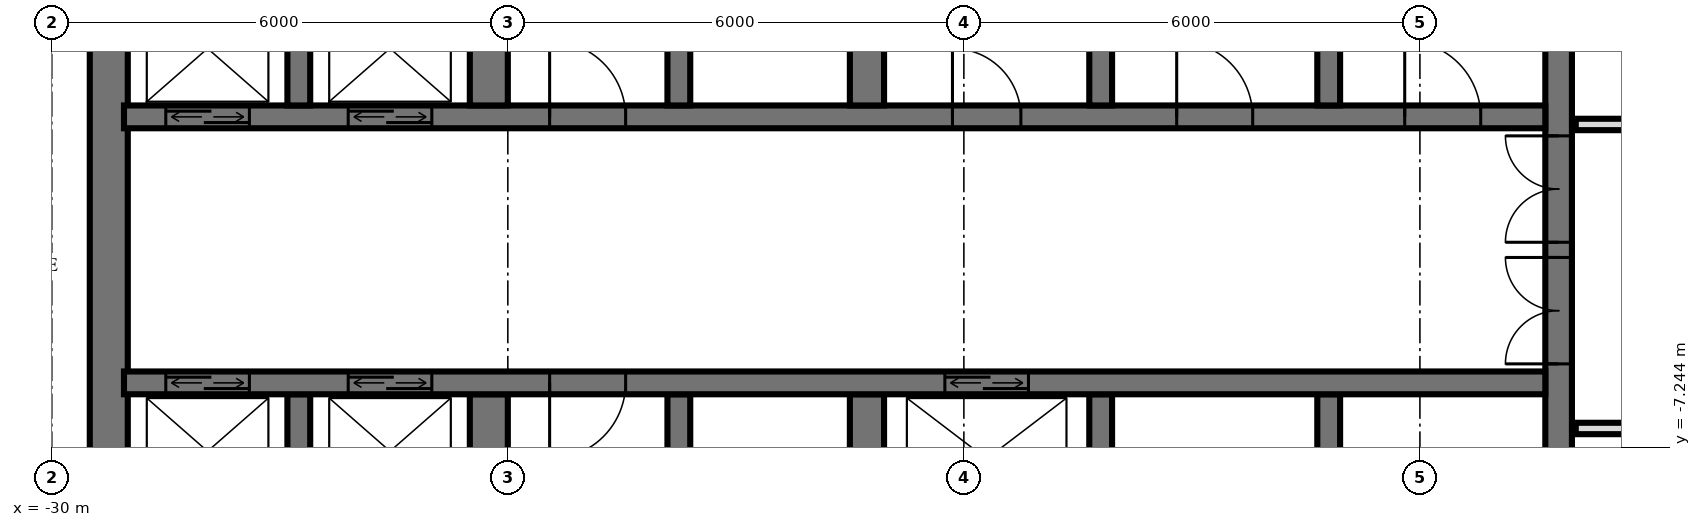
"""IFC4 building model, lengths in metres.
Left out: names, types, materials, properties, quantities, classifications, styles, units other than length and angle.
Written with IfcOpenShell. Run it as: python <this file> out.ifc"""

import sys

from ifc_helpers import new_model, si_unit, direction, frame, frame_2d, origin, place, context, subcontext, project, spatial, rectangle, extrude, element, fill, save


model = new_model("IFC4")
c1 = context("Model", 3, precision=1e-05, world=origin(), true_north=direction((0.0, 1.0)))
c2 = subcontext(c1, "Body", "Model", "MODEL_VIEW")
j1 = project(units=[si_unit("LENGTHUNIT", "METRE"), si_unit("PLANEANGLEUNIT", "RADIAN")], contexts=[c1])
p1 = place(None, origin())
s1 = spatial("IfcSite", under=j1, at=p1, CompositionType="ELEMENT")
p2 = place(p1, origin())
s2 = spatial("IfcBuilding", under=s1, at=p2, CompositionType="ELEMENT")
p3 = place(p2, frame((0.0, 0.0, 56.4)))
s3 = spatial("IfcBuildingStorey", under=s2, at=p3, CompositionType="ELEMENT", Elevation=56.4)
p4 = place(p3, frame((-10.175, -14.55, 0.0), z_axis=(0.0, 0.0, 1.0), x_axis=(0.0, 1.0, 0.0)))
e1 = element("IfcWall", 1, at=p4, inside=s3, PredefinedType="SHEAR", context=c2, shape_type="SweptSolid", body=[
    extrude(rectangle(XDim=14.1, YDim=0.35, at=frame_2d((7.05, 0.0))), origin(), (0.0, 0.0, 1.0), 3.6),
])
p5 = place(p4, frame((8.4, 0.0, 0.0)))
e2 = element("IfcOpeningElement", 2, at=p5, cuts=e1, PredefinedType="OPENING", context=c2, shape_type="SweptSolid", body=[
    extrude(rectangle(XDim=1.4, YDim=2.4, at=frame_2d((0.7, 1.2))), frame((0.0, 0.185, 0.0), z_axis=(0.0, -1.0, 0.0), x_axis=(1.0, 0.0, 0.0)), (0.0, 0.0, 1.0), 0.37),
])
p6 = place(p4, frame((10.0, 0.0, 0.0)))
e3 = element("IfcOpeningElement", 3, at=p6, cuts=e1, PredefinedType="OPENING", context=c2, shape_type="SweptSolid", body=[
    extrude(rectangle(XDim=1.4, YDim=2.4, at=frame_2d((0.7, 1.2))), frame((0.0, 0.185, 0.0), z_axis=(0.0, -1.0, 0.0), x_axis=(1.0, 0.0, 0.0)), (0.0, 0.0, 1.0), 0.37),
])
p7 = place(p4, frame((4.0, 0.0, 0.0)))
e4 = element("IfcOpeningElement", 4, at=p7, cuts=e1, PredefinedType="OPENING", context=c2, shape_type="SweptSolid", body=[
    extrude(rectangle(XDim=1.2, YDim=2.1, at=frame_2d((0.6, 1.05))), frame((0.0, 0.185, 0.0), z_axis=(0.0, -1.0, 0.0), x_axis=(1.0, 0.0, 0.0)), (0.0, 0.0, 1.0), 0.37),
])
p8 = place(p3, frame((-29.25, -14.55, 0.0), z_axis=(0.0, 0.0, 1.0), x_axis=(0.0, 1.0, 0.0)))
e5 = element("IfcWall", 5, at=p8, inside=s3, PredefinedType="SHEAR", context=c2, shape_type="SweptSolid", body=[
    extrude(rectangle(XDim=14.1, YDim=0.5, at=frame_2d((7.05, 0.0))), origin(), (0.0, 0.0, 1.0), 3.6),
])
p9 = place(p3, frame((-29.05, -2.9, 0.0), z_axis=(0.0, 0.0, 1.0), x_axis=(1.0, 0.0, 0.0)))
e6 = element("IfcWall", 6, at=p9, inside=s3, PredefinedType="SHEAR", context=c2, shape_type="SweptSolid", body=[
    extrude(rectangle(XDim=18.7, YDim=0.3, at=frame_2d((9.35, 0.0))), origin(), (0.0, 0.0, 1.0), 3.6),
])
p10 = place(p9, frame((2.95, 0.0, 0.0)))
e7 = element("IfcOpeningElement", 7, at=p10, cuts=e6, PredefinedType="OPENING", context=c2, shape_type="SweptSolid", body=[
    extrude(rectangle(XDim=1.1, YDim=2.1, at=frame_2d((0.55, 1.05))), frame((0.0, 0.16, 0.0), z_axis=(0.0, -1.0, 0.0), x_axis=(1.0, 0.0, 0.0)), (0.0, 0.0, 1.0), 0.32),
])
p11 = place(p9, frame((0.55, 0.0, 0.0)))
e8 = element("IfcOpeningElement", 8, at=p11, cuts=e6, PredefinedType="OPENING", context=c2, shape_type="SweptSolid", body=[
    extrude(rectangle(XDim=1.1, YDim=2.1, at=frame_2d((0.55, 1.05))), frame((0.0, 0.16, 0.0), z_axis=(0.0, -1.0, 0.0), x_axis=(1.0, 0.0, 0.0)), (0.0, 0.0, 1.0), 0.32),
])
p12 = place(p9, frame((10.9, 0.0, 0.0)))
e9 = element("IfcOpeningElement", 9, at=p12, cuts=e6, PredefinedType="OPENING", context=c2, shape_type="SweptSolid", body=[
    extrude(rectangle(XDim=0.9, YDim=2.1, at=frame_2d((0.45, 1.05))), frame((0.0, 0.16, 0.0), z_axis=(0.0, -1.0, 0.0), x_axis=(1.0, 0.0, 0.0)), (0.0, 0.0, 1.0), 0.32),
])
p13 = place(p9, frame((16.85, 0.0, 0.0)))
e10 = element("IfcOpeningElement", 10, at=p13, cuts=e6, PredefinedType="OPENING", context=c2, shape_type="SweptSolid", body=[
    extrude(rectangle(XDim=1.0, YDim=2.1, at=frame_2d((0.5, 1.05))), frame((0.0, 0.16, 0.0), z_axis=(0.0, -1.0, 0.0), x_axis=(1.0, 0.0, 0.0)), (0.0, 0.0, 1.0), 0.32),
])
p14 = place(p9, frame((13.85, 0.0, 0.0)))
e11 = element("IfcOpeningElement", 11, at=p14, cuts=e6, PredefinedType="OPENING", context=c2, shape_type="SweptSolid", body=[
    extrude(rectangle(XDim=1.0, YDim=2.1, at=frame_2d((0.5, 1.05))), frame((0.0, 0.16, 0.0), z_axis=(0.0, -1.0, 0.0), x_axis=(1.0, 0.0, 0.0)), (0.0, 0.0, 1.0), 0.32),
])
p15 = place(p9, frame((5.6, 0.0, 0.0)))
e12 = element("IfcOpeningElement", 12, at=p15, cuts=e6, PredefinedType="OPENING", context=c2, shape_type="SweptSolid", body=[
    extrude(rectangle(XDim=1.0, YDim=2.1, at=frame_2d((0.5, 1.05))), frame((0.0, 0.16, 0.0), z_axis=(0.0, -1.0, 0.0), x_axis=(1.0, 0.0, 0.0)), (0.0, 0.0, 1.0), 0.32),
])
p16 = place(p3, frame((-29.05, -6.4, 0.0), z_axis=(0.0, 0.0, 1.0), x_axis=(1.0, 0.0, 0.0)))
e13 = element("IfcWall", 13, at=p16, inside=s3, PredefinedType="SHEAR", context=c2, shape_type="SweptSolid", body=[
    extrude(rectangle(XDim=18.7, YDim=0.3, at=frame_2d((9.35, 0.0))), origin(), (0.0, 0.0, 1.0), 3.6),
])
p17 = place(p16, frame((2.95, 0.0, 0.0)))
e14 = element("IfcOpeningElement", 14, at=p17, cuts=e13, PredefinedType="OPENING", context=c2, shape_type="SweptSolid", body=[
    extrude(rectangle(XDim=1.1, YDim=2.1, at=frame_2d((0.55, 1.05))), frame((0.0, 0.16, 0.0), z_axis=(0.0, -1.0, 0.0), x_axis=(1.0, 0.0, 0.0)), (0.0, 0.0, 1.0), 0.32),
])
p18 = place(p16, frame((0.55, 0.0, 0.0)))
e15 = element("IfcOpeningElement", 15, at=p18, cuts=e13, PredefinedType="OPENING", context=c2, shape_type="SweptSolid", body=[
    extrude(rectangle(XDim=1.1, YDim=2.1, at=frame_2d((0.55, 1.05))), frame((0.0, 0.16, 0.0), z_axis=(0.0, -1.0, 0.0), x_axis=(1.0, 0.0, 0.0)), (0.0, 0.0, 1.0), 0.32),
])
p19 = place(p16, frame((10.8, 0.0, 0.0)))
e16 = element("IfcOpeningElement", 16, at=p19, cuts=e13, PredefinedType="OPENING", context=c2, shape_type="SweptSolid", body=[
    extrude(rectangle(XDim=1.1, YDim=2.1, at=frame_2d((0.55, 1.05))), frame((0.0, 0.16, 0.0), z_axis=(0.0, -1.0, 0.0), x_axis=(1.0, 0.0, 0.0)), (0.0, 0.0, 1.0), 0.32),
])
p20 = place(p16, frame((5.6, 0.0, 0.0)))
e17 = element("IfcOpeningElement", 17, at=p20, cuts=e13, PredefinedType="OPENING", context=c2, shape_type="SweptSolid", body=[
    extrude(rectangle(XDim=1.0, YDim=2.1, at=frame_2d((0.5, 1.05))), frame((0.0, 0.16, 0.0), z_axis=(0.0, -1.0, 0.0), x_axis=(1.0, 0.0, 0.0)), (0.0, 0.0, 1.0), 0.32),
])
for number, where, z_axis, x_axis in (
    (18, (-13.2, -2.75, 0.0), (0.0, 0.0, 1.0), (0.0, 1.0, 0.0)),
    (19, (-13.2, -8.85, 0.0), (0.0, 0.0, 1.0), (0.0, 1.0, 0.0)),
    (20, (-16.2, -2.75, 0.0), (0.0, 0.0, 1.0), (0.0, 1.0, 0.0)),
    (21, (-16.2, -8.85, 0.0), (0.0, 0.0, 1.0), (0.0, 1.0, 0.0)),
):
    element("IfcWall", number, at=place(p3, frame(where, z_axis=z_axis, x_axis=x_axis)), inside=s3, PredefinedType="SHEAR", context=c2, shape_type="SweptSolid", body=[
        extrude(rectangle(XDim=2.3, YDim=0.3, at=frame_2d((1.15, 0.0))), origin(), (0.0, 0.0, 1.0), 3.6),
    ])
for number, where, z_axis, x_axis in (
    (22, (-19.275, -2.75, 0.0), (0.0, 0.0, 1.0), (0.0, 1.0, 0.0)),
    (23, (-19.275, -8.85, 0.0), (0.0, 0.0, 1.0), (0.0, 1.0, 0.0)),
):
    element("IfcWall", number, at=place(p3, frame(where, z_axis=z_axis, x_axis=x_axis)), inside=s3, PredefinedType="SHEAR", context=c2, shape_type="SweptSolid", body=[
        extrude(rectangle(XDim=2.3, YDim=0.45, at=frame_2d((1.15, 0.0))), origin(), (0.0, 0.0, 1.0), 3.6),
    ])
for number, where, z_axis, x_axis in (
    (24, (-21.75, -2.75, 0.0), (0.0, 0.0, 1.0), (0.0, 1.0, 0.0)),
    (25, (-21.75, -8.85, 0.0), (0.0, 0.0, 1.0), (0.0, 1.0, 0.0)),
):
    element("IfcWall", number, at=place(p3, frame(where, z_axis=z_axis, x_axis=x_axis)), inside=s3, PredefinedType="SHEAR", context=c2, shape_type="SweptSolid", body=[
        extrude(rectangle(XDim=2.3, YDim=0.3, at=frame_2d((1.15, 0.0))), origin(), (0.0, 0.0, 1.0), 3.6),
    ])
for number, where, z_axis, x_axis in (
    (26, (-24.25, -2.75, 0.0), (0.0, 0.0, 1.0), (0.0, 1.0, 0.0)),
    (27, (-24.25, -8.85, 0.0), (0.0, 0.0, 1.0), (0.0, 1.0, 0.0)),
):
    element("IfcWall", number, at=place(p3, frame(where, z_axis=z_axis, x_axis=x_axis)), inside=s3, PredefinedType="SHEAR", context=c2, shape_type="SweptSolid", body=[
        extrude(rectangle(XDim=2.3, YDim=0.5, at=frame_2d((1.15, 0.0))), origin(), (0.0, 0.0, 1.0), 3.6),
    ])
for number, where, z_axis, x_axis in (
    (28, (-26.75, -2.75, 0.0), (0.0, 0.0, 1.0), (0.0, 1.0, 0.0)),
    (29, (-26.75, -8.85, 0.0), (0.0, 0.0, 1.0), (0.0, 1.0, 0.0)),
):
    element("IfcWall", number, at=place(p3, frame(where, z_axis=z_axis, x_axis=x_axis)), inside=s3, PredefinedType="SHEAR", context=c2, shape_type="SweptSolid", body=[
        extrude(rectangle(XDim=2.3, YDim=0.3, at=frame_2d((1.15, 0.0))), origin(), (0.0, 0.0, 1.0), 3.6),
    ])
p21 = place(p3, frame((-9.95, -7.0, 0.0), z_axis=(0.0, 0.0, 1.0), x_axis=(1.0, 0.0, 0.0)))
e30 = element("IfcWall", 30, at=p21, inside=s3, PredefinedType="PARTITIONING", context=c2, shape_type="SweptSolid", body=[
    extrude(rectangle(XDim=19.9, YDim=0.15, at=frame_2d((9.95, 0.0))), origin(), (0.0, 0.0, 1.0), 3.32),
])
p22 = place(p21, frame((9.45, 0.0, 0.0)))
e31 = element("IfcOpeningElement", 31, at=p22, cuts=e30, PredefinedType="OPENING", context=c2, shape_type="SweptSolid", body=[
    extrude(rectangle(XDim=1.0, YDim=2.1, at=frame_2d((0.5, 1.05))), frame((0.0, 0.085, 0.0), z_axis=(0.0, -1.0, 0.0), x_axis=(1.0, 0.0, 0.0)), (0.0, 0.0, 1.0), 0.17),
])
p23 = place(p21, frame((15.45, 0.0, 0.0)))
e32 = element("IfcOpeningElement", 32, at=p23, cuts=e30, PredefinedType="OPENING", context=c2, shape_type="SweptSolid", body=[
    extrude(rectangle(XDim=1.0, YDim=2.1, at=frame_2d((0.5, 1.05))), frame((0.0, 0.085, 0.0), z_axis=(0.0, -1.0, 0.0), x_axis=(1.0, 0.0, 0.0)), (0.0, 0.0, 1.0), 0.17),
])
p24 = place(p3, frame((-9.95, -3.0, 0.0), z_axis=(0.0, 0.0, 1.0), x_axis=(1.0, 0.0, 0.0)))
e33 = element("IfcWall", 33, at=p24, inside=s3, PredefinedType="PARTITIONING", context=c2, shape_type="SweptSolid", body=[
    extrude(rectangle(XDim=19.9, YDim=0.15, at=frame_2d((9.95, 0.0))), origin(), (0.0, 0.0, 1.0), 3.32),
])
p25 = place(p24, frame((0.95, 0.0, 0.0)))
e34 = element("IfcOpeningElement", 34, at=p25, cuts=e33, PredefinedType="OPENING", context=c2, shape_type="SweptSolid", body=[
    extrude(rectangle(XDim=1.0, YDim=2.1, at=frame_2d((0.5, 1.05))), frame((0.0, 0.085, 0.0), z_axis=(0.0, -1.0, 0.0), x_axis=(1.0, 0.0, 0.0)), (0.0, 0.0, 1.0), 0.17),
])
p26 = place(p24, frame((3.7, 0.0, 0.0)))
e35 = element("IfcOpeningElement", 35, at=p26, cuts=e33, PredefinedType="OPENING", context=c2, shape_type="SweptSolid", body=[
    extrude(rectangle(XDim=1.0, YDim=2.1, at=frame_2d((0.5, 1.05))), frame((0.0, 0.085, 0.0), z_axis=(0.0, -1.0, 0.0), x_axis=(1.0, 0.0, 0.0)), (0.0, 0.0, 1.0), 0.17),
])
p27 = place(p24, frame((7.95, 0.0, 0.0)))
e36 = element("IfcOpeningElement", 36, at=p27, cuts=e33, PredefinedType="OPENING", context=c2, shape_type="SweptSolid", body=[
    extrude(rectangle(XDim=1.0, YDim=2.1, at=frame_2d((0.5, 1.05))), frame((0.0, 0.085, 0.0), z_axis=(0.0, -1.0, 0.0), x_axis=(1.0, 0.0, 0.0)), (0.0, 0.0, 1.0), 0.17),
])
p28 = place(p24, frame((15.2, 0.0, 0.0)))
e37 = element("IfcOpeningElement", 37, at=p28, cuts=e33, PredefinedType="OPENING", context=c2, shape_type="SweptSolid", body=[
    extrude(rectangle(XDim=1.0, YDim=2.1, at=frame_2d((0.5, 1.05))), frame((0.0, 0.085, 0.0), z_axis=(0.0, -1.0, 0.0), x_axis=(1.0, 0.0, 0.0)), (0.0, 0.0, 1.0), 0.17),
])
p29 = place(p10, origin())
e38 = element("IfcDoor", 38, at=p29, inside=s3, OperationType="DOUBLE_DOOR_SLIDING", PredefinedType="USERDEFINED", context=c2, shape_type="SweptSolid", body=[
    extrude(rectangle(XDim=1.1, YDim=2.1, at=frame_2d((0.55, 1.05))), frame((0.0, 0.025, 0.0), z_axis=(0.0, -1.0, 0.0), x_axis=(1.0, 0.0, 0.0)), (0.0, 0.0, 1.0), 0.05),
])
fill(e7, e38)
p30 = place(p11, origin())
e39 = element("IfcDoor", 39, at=p30, inside=s3, OperationType="DOUBLE_DOOR_SLIDING", PredefinedType="USERDEFINED", context=c2, shape_type="SweptSolid", body=[
    extrude(rectangle(XDim=1.1, YDim=2.1, at=frame_2d((0.55, 1.05))), frame((0.0, 0.025, 0.0), z_axis=(0.0, -1.0, 0.0), x_axis=(1.0, 0.0, 0.0)), (0.0, 0.0, 1.0), 0.05),
])
fill(e8, e39)
p31 = place(p17, origin())
e40 = element("IfcDoor", 40, at=p31, inside=s3, OperationType="DOUBLE_DOOR_SLIDING", PredefinedType="USERDEFINED", context=c2, shape_type="SweptSolid", body=[
    extrude(rectangle(XDim=1.1, YDim=2.1, at=frame_2d((0.55, 1.05))), frame((0.0, 0.025, 0.0), z_axis=(0.0, -1.0, 0.0), x_axis=(1.0, 0.0, 0.0)), (0.0, 0.0, 1.0), 0.05),
])
fill(e14, e40)
p32 = place(p18, origin())
e41 = element("IfcDoor", 41, at=p32, inside=s3, OperationType="DOUBLE_DOOR_SLIDING", PredefinedType="USERDEFINED", context=c2, shape_type="SweptSolid", body=[
    extrude(rectangle(XDim=1.1, YDim=2.1, at=frame_2d((0.55, 1.05))), frame((0.0, 0.025, 0.0), z_axis=(0.0, -1.0, 0.0), x_axis=(1.0, 0.0, 0.0)), (0.0, 0.0, 1.0), 0.05),
])
fill(e15, e41)
p33 = place(p19, origin())
e42 = element("IfcDoor", 42, at=p33, inside=s3, OperationType="DOUBLE_DOOR_SLIDING", PredefinedType="USERDEFINED", context=c2, shape_type="SweptSolid", body=[
    extrude(rectangle(XDim=1.1, YDim=2.1, at=frame_2d((0.55, 1.05))), frame((0.0, 0.025, 0.0), z_axis=(0.0, -1.0, 0.0), x_axis=(1.0, 0.0, 0.0)), (0.0, 0.0, 1.0), 0.05),
])
fill(e16, e42)
p34 = place(p5, origin())
e43 = element("IfcDoor", 43, at=p34, inside=s3, OperationType="DOUBLE_DOOR_SINGLE_SWING", PredefinedType="DOOR", context=c2, shape_type="SweptSolid", body=[
    extrude(rectangle(XDim=1.4, YDim=2.4, at=frame_2d((0.7, 1.2))), frame((0.0, 0.025, 0.0), z_axis=(0.0, -1.0, 0.0), x_axis=(1.0, 0.0, 0.0)), (0.0, 0.0, 1.0), 0.05),
])
fill(e2, e43)
p35 = place(p6, origin())
e44 = element("IfcDoor", 44, at=p35, inside=s3, OperationType="DOUBLE_DOOR_SINGLE_SWING", PredefinedType="DOOR", context=c2, shape_type="SweptSolid", body=[
    extrude(rectangle(XDim=1.4, YDim=2.4, at=frame_2d((0.7, 1.2))), frame((0.0, 0.025, 0.0), z_axis=(0.0, -1.0, 0.0), x_axis=(1.0, 0.0, 0.0)), (0.0, 0.0, 1.0), 0.05),
])
fill(e3, e44)
p36 = place(p12, origin())
e45 = element("IfcDoor", 45, at=p36, inside=s3, OperationType="SINGLE_SWING_RIGHT", PredefinedType="DOOR", context=c2, shape_type="SweptSolid", body=[
    extrude(rectangle(XDim=0.9, YDim=2.1, at=frame_2d((0.45, 1.05))), frame((0.0, 0.025, 0.0), z_axis=(0.0, -1.0, 0.0), x_axis=(1.0, 0.0, 0.0)), (0.0, 0.0, 1.0), 0.05),
])
fill(e9, e45)
p37 = place(p13, origin())
e46 = element("IfcDoor", 46, at=p37, inside=s3, OperationType="SINGLE_SWING_RIGHT", PredefinedType="DOOR", context=c2, shape_type="SweptSolid", body=[
    extrude(rectangle(XDim=1.0, YDim=2.1, at=frame_2d((0.5, 1.05))), frame((0.0, 0.025, 0.0), z_axis=(0.0, -1.0, 0.0), x_axis=(1.0, 0.0, 0.0)), (0.0, 0.0, 1.0), 0.05),
])
fill(e10, e46)
p38 = place(p14, origin())
e47 = element("IfcDoor", 47, at=p38, inside=s3, OperationType="SINGLE_SWING_RIGHT", PredefinedType="DOOR", context=c2, shape_type="SweptSolid", body=[
    extrude(rectangle(XDim=1.0, YDim=2.1, at=frame_2d((0.5, 1.05))), frame((0.0, 0.025, 0.0), z_axis=(0.0, -1.0, 0.0), x_axis=(1.0, 0.0, 0.0)), (0.0, 0.0, 1.0), 0.05),
])
fill(e11, e47)
p39 = place(p15, origin())
e48 = element("IfcDoor", 48, at=p39, inside=s3, OperationType="SINGLE_SWING_RIGHT", PredefinedType="DOOR", context=c2, shape_type="SweptSolid", body=[
    extrude(rectangle(XDim=1.0, YDim=2.1, at=frame_2d((0.5, 1.05))), frame((0.0, 0.025, 0.0), z_axis=(0.0, -1.0, 0.0), x_axis=(1.0, 0.0, 0.0)), (0.0, 0.0, 1.0), 0.05),
])
fill(e12, e48)
p40 = place(p20, frame((0.5, 0.0, 0.0), z_axis=(0.0, 0.0, 1.0), x_axis=(-1.0, 0.0, 0.0)))
e49 = element("IfcDoor", 49, at=p40, inside=s3, OperationType="SINGLE_SWING_LEFT", PredefinedType="DOOR", context=c2, shape_type="SweptSolid", body=[
    extrude(rectangle(XDim=1.0, YDim=2.1, at=frame_2d((0.0, 1.05))), frame((0.0, -0.025, 0.0), z_axis=(0.0, 1.0, 0.0), x_axis=(-1.0, 0.0, 0.0)), (0.0, 0.0, 1.0), 0.05),
])
fill(e17, e49)
save(model, sys.argv[1])
